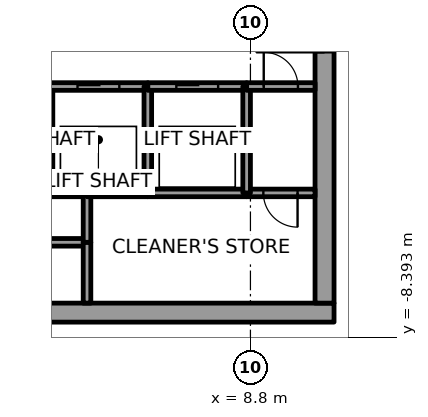
"""IFC4 building model, lengths in metres.
Left out: names, types, materials, properties, quantities, classifications, styles, units other than length and angle.
Written with IfcOpenShell. Run it as: python <this file> out.ifc"""

import sys

from ifc_helpers import new_model, si_unit, direction, frame, frame_2d, origin, place, context, subcontext, project, spatial, rectangle, extrude, element, fill, save


model = new_model("IFC4")
c1 = context("Model", 3, precision=1e-05, world=origin(), true_north=direction((0.0, 1.0)))
c2 = subcontext(c1, "Body", "Model", "MODEL_VIEW")
j1 = project(units=[si_unit("LENGTHUNIT", "METRE"), si_unit("PLANEANGLEUNIT", "RADIAN")], contexts=[c1])
p1 = place(None, origin())
s1 = spatial("IfcSite", under=j1, at=p1, CompositionType="ELEMENT")
p2 = place(p1, origin())
s2 = spatial("IfcBuilding", under=s1, at=p2, CompositionType="ELEMENT")
p3 = place(p2, frame((0.0, 0.0, 201.8)))
s3 = spatial("IfcBuildingStorey", under=s2, at=p3, CompositionType="ELEMENT", Elevation=201.8)
p4 = place(p3, frame((-11.0, -7.75, 0.0), z_axis=(0.0, 0.0, 1.0), x_axis=(1.0, 0.0, 0.0)))
e1 = element("IfcWall", 1, at=p4, inside=s3, PredefinedType="SHEAR", context=c2, shape_type="SweptSolid", body=[
    extrude(rectangle(XDim=22.0, YDim=0.5, at=frame_2d((11.0, 0.0))), origin(), (0.0, 0.0, 1.0), 4.0),
])
p5 = place(p4, frame((10.45, 0.0, 0.0)))
e2 = element("IfcOpeningElement", 2, at=p5, cuts=e1, PredefinedType="OPENING", context=c2, shape_type="SweptSolid", body=[
    extrude(rectangle(XDim=1.1, YDim=2.1, at=frame_2d((0.55, 1.05))), frame((0.0, 0.25, 0.0), z_axis=(0.0, -1.0, 0.0), x_axis=(1.0, 0.0, 0.0)), (0.0, 0.0, 1.0), 0.5),
])
p6 = place(p3, frame((10.75, -7.5, 0.0), z_axis=(0.0, 0.0, 1.0), x_axis=(0.0, 1.0, 0.0)))
e3 = element("IfcWall", 3, at=p6, inside=s3, PredefinedType="SHEAR", context=c2, shape_type="SweptSolid", body=[
    extrude(rectangle(XDim=15.0, YDim=0.5, at=frame_2d((7.5, 0.0))), origin(), (0.0, 0.0, 1.0), 4.0),
])
p7 = place(p6, frame((6.6, 0.0, 0.0)))
e4 = element("IfcOpeningElement", 4, at=p7, cuts=e3, PredefinedType="OPENING", context=c2, shape_type="SweptSolid", body=[
    extrude(rectangle(XDim=1.8, YDim=2.1, at=frame_2d((0.9, 1.05))), frame((0.0, 0.25, 0.0), z_axis=(0.0, -1.0, 0.0), x_axis=(1.0, 0.0, 0.0)), (0.0, 0.0, 1.0), 0.5),
])
p8 = place(p3, frame((4.5, -5.9, 0.0), z_axis=(0.0, 0.0, 1.0), x_axis=(-1.0, 0.0, 0.0)))
e5 = element("IfcWall", 5, at=p8, inside=s3, PredefinedType="SOLIDWALL", context=c2, shape_type="SweptSolid", body=[
    extrude(rectangle(XDim=2.5, YDim=0.2, at=frame_2d((1.25, 0.0))), origin(), (0.0, 0.0, 1.0), 3.85),
])
p9 = place(p3, frame((4.5, -4.6, 0.0), z_axis=(0.0, 0.0, 1.0), x_axis=(-1.0, 0.0, 0.0)))
e6 = element("IfcWall", 6, at=p9, inside=s3, PredefinedType="SOLIDWALL", context=c2, shape_type="SweptSolid", body=[
    extrude(rectangle(XDim=1.0, YDim=0.2, at=frame_2d((0.5, 0.0))), origin(), (0.0, 0.0, 1.0), 3.85),
])
p10 = place(p3, frame((3.5, -1.8, 0.0), z_axis=(0.0, 0.0, 1.0), x_axis=(1.0, 0.0, 0.0)))
e7 = element("IfcWall", 7, at=p10, inside=s3, PredefinedType="SOLIDWALL", context=c2, shape_type="SweptSolid", body=[
    extrude(rectangle(XDim=2.6, YDim=0.2, at=frame_2d((1.3, 0.0))), origin(), (0.0, 0.0, 1.0), 3.85),
])
p11 = place(p10, frame((0.75, 0.0, 0.0)))
e8 = element("IfcOpeningElement", 8, at=p11, cuts=e7, PredefinedType="OPENING", context=c2, shape_type="SweptSolid", body=[
    extrude(rectangle(XDim=1.1, YDim=2.1, at=frame_2d((0.55, 1.05))), frame((0.0, 0.1, 0.0), z_axis=(0.0, -1.0, 0.0), x_axis=(1.0, 0.0, 0.0)), (0.0, 0.0, 1.0), 0.2),
])
p12 = place(p3, frame((4.5, -5.9, 0.0), z_axis=(0.0, 0.0, 1.0), x_axis=(0.0, -1.0, 0.0)))
e9 = element("IfcWall", 9, at=p12, inside=s3, PredefinedType="SOLIDWALL", context=c2, shape_type="SweptSolid", body=[
    extrude(rectangle(XDim=1.6, YDim=0.2, at=frame_2d((0.8, 0.0))), origin(), (0.0, 0.0, 1.0), 3.85),
])
p13 = place(p3, frame((4.5, -4.6, 0.0), z_axis=(0.0, 0.0, 1.0), x_axis=(0.0, -1.0, 0.0)))
e10 = element("IfcWall", 10, at=p13, inside=s3, PredefinedType="SOLIDWALL", context=c2, shape_type="SweptSolid", body=[
    extrude(rectangle(XDim=1.3, YDim=0.2, at=frame_2d((0.65, 0.0))), origin(), (0.0, 0.0, 1.0), 3.85),
])
p14 = place(p3, frame((6.1, -4.6, 0.0), z_axis=(0.0, 0.0, 1.0), x_axis=(-1.0, 0.0, 0.0)))
e11 = element("IfcWall", 11, at=p14, inside=s3, PredefinedType="SOLIDWALL", context=c2, shape_type="SweptSolid", body=[
    extrude(rectangle(XDim=1.6, YDim=0.2, at=frame_2d((0.8, 0.0))), origin(), (0.0, 0.0, 1.0), 3.85),
])
p15 = place(p3, frame((8.7, -4.6, 0.0), z_axis=(0.0, 0.0, 1.0), x_axis=(-1.0, 0.0, 0.0)))
e12 = element("IfcWall", 12, at=p15, inside=s3, PredefinedType="SOLIDWALL", context=c2, shape_type="SweptSolid", body=[
    extrude(rectangle(XDim=2.6, YDim=0.2, at=frame_2d((1.3, 0.0))), origin(), (0.0, 0.0, 1.0), 3.85),
])
p16 = place(p3, frame((6.1, -4.6, 0.0), z_axis=(0.0, 0.0, 1.0), x_axis=(0.0, 1.0, 0.0)))
e13 = element("IfcWall", 13, at=p16, inside=s3, PredefinedType="SOLIDWALL", context=c2, shape_type="SweptSolid", body=[
    extrude(rectangle(XDim=2.8, YDim=0.2, at=frame_2d((1.4, 0.0))), origin(), (0.0, 0.0, 1.0), 3.85),
])
p17 = place(p3, frame((6.1, -1.8, 0.0), z_axis=(0.0, 0.0, 1.0), x_axis=(1.0, 0.0, 0.0)))
e14 = element("IfcWall", 14, at=p17, inside=s3, PredefinedType="SOLIDWALL", context=c2, shape_type="SweptSolid", body=[
    extrude(rectangle(XDim=2.6, YDim=0.2, at=frame_2d((1.3, 0.0))), origin(), (0.0, 0.0, 1.0), 3.85),
])
p18 = place(p17, frame((0.75, 0.0, 0.0)))
e15 = element("IfcOpeningElement", 15, at=p18, cuts=e14, PredefinedType="OPENING", context=c2, shape_type="SweptSolid", body=[
    extrude(rectangle(XDim=1.1, YDim=2.1, at=frame_2d((0.55, 1.05))), frame((0.0, 0.1, 0.0), z_axis=(0.0, -1.0, 0.0), x_axis=(1.0, 0.0, 0.0)), (0.0, 0.0, 1.0), 0.2),
])
p19 = place(p3, frame((10.5, -4.6, 0.0), z_axis=(0.0, 0.0, 1.0), x_axis=(-1.0, 0.0, 0.0)))
e16 = element("IfcWall", 16, at=p19, inside=s3, PredefinedType="SOLIDWALL", context=c2, shape_type="SweptSolid", body=[
    extrude(rectangle(XDim=1.8, YDim=0.2, at=frame_2d((0.9, 0.0))), origin(), (0.0, 0.0, 1.0), 3.85),
])
p20 = place(p19, frame((0.46, 0.0, 0.0)))
e17 = element("IfcOpeningElement", 17, at=p20, cuts=e16, PredefinedType="OPENING", context=c2, shape_type="SweptSolid", body=[
    extrude(rectangle(XDim=0.9, YDim=2.1, at=frame_2d((0.45, 1.05))), frame((0.0, 0.1, 0.0), z_axis=(0.0, -1.0, 0.0), x_axis=(1.0, 0.0, 0.0)), (0.0, 0.0, 1.0), 0.2),
])
p21 = place(p3, frame((8.7, -1.8, 0.0), z_axis=(0.0, 0.0, 1.0), x_axis=(0.0, -1.0, 0.0)))
e18 = element("IfcWall", 18, at=p21, inside=s3, PredefinedType="SOLIDWALL", context=c2, shape_type="SweptSolid", body=[
    extrude(rectangle(XDim=2.8, YDim=0.2, at=frame_2d((1.4, 0.0))), origin(), (0.0, 0.0, 1.0), 3.85),
])
p22 = place(p3, frame((8.7, -1.8, 0.0), z_axis=(0.0, 0.0, 1.0), x_axis=(1.0, 0.0, 0.0)))
e19 = element("IfcWall", 19, at=p22, inside=s3, PredefinedType="SOLIDWALL", context=c2, shape_type="SweptSolid", body=[
    extrude(rectangle(XDim=1.8, YDim=0.2, at=frame_2d((0.9, 0.0))), origin(), (0.0, 0.0, 1.0), 3.85),
])
p23 = place(p22, frame((0.45, 0.0, 0.0)))
e20 = element("IfcOpeningElement", 20, at=p23, cuts=e19, PredefinedType="OPENING", context=c2, shape_type="SweptSolid", body=[
    extrude(rectangle(XDim=0.9, YDim=2.1, at=frame_2d((0.45, 1.05))), frame((0.0, 0.1, 0.0), z_axis=(0.0, -1.0, 0.0), x_axis=(1.0, 0.0, 0.0)), (0.0, 0.0, 1.0), 0.2),
])
p24 = place(p11, origin())
e21 = element("IfcDoor", 21, at=p24, inside=s3, OperationType="SLIDING_TO_LEFT", PredefinedType="DOOR", context=c2, shape_type="SweptSolid", body=[
    extrude(rectangle(XDim=1.1, YDim=2.1, at=frame_2d((0.55, 1.05))), frame((0.0, 0.025, 0.0), z_axis=(0.0, -1.0, 0.0), x_axis=(1.0, 0.0, 0.0)), (0.0, 0.0, 1.0), 0.05),
])
fill(e8, e21)
p25 = place(p18, origin())
e22 = element("IfcDoor", 22, at=p25, inside=s3, OperationType="SLIDING_TO_RIGHT", PredefinedType="DOOR", context=c2, shape_type="SweptSolid", body=[
    extrude(rectangle(XDim=1.1, YDim=2.1, at=frame_2d((0.55, 1.05))), frame((0.0, 0.025, 0.0), z_axis=(0.0, -1.0, 0.0), x_axis=(1.0, 0.0, 0.0)), (0.0, 0.0, 1.0), 0.05),
])
fill(e15, e22)
p26 = place(p20, origin())
e23 = element("IfcDoor", 23, at=p26, inside=s3, OperationType="SINGLE_SWING_LEFT", PredefinedType="DOOR", context=c2, shape_type="SweptSolid", body=[
    extrude(rectangle(XDim=0.9, YDim=2.1, at=frame_2d((0.45, 1.05))), frame((0.0, 0.025, 0.0), z_axis=(0.0, -1.0, 0.0), x_axis=(1.0, 0.0, 0.0)), (0.0, 0.0, 1.0), 0.05),
])
fill(e17, e23)
p27 = place(p23, origin())
e24 = element("IfcDoor", 24, at=p27, inside=s3, OperationType="SINGLE_SWING_LEFT", PredefinedType="DOOR", context=c2, shape_type="SweptSolid", body=[
    extrude(rectangle(XDim=0.9, YDim=2.1, at=frame_2d((0.45, 1.05))), frame((0.0, 0.025, 0.0), z_axis=(0.0, -1.0, 0.0), x_axis=(1.0, 0.0, 0.0)), (0.0, 0.0, 1.0), 0.05),
])
fill(e20, e24)
p28 = place(p7, origin())
e25 = element("IfcDoor", 25, at=p28, inside=s3, OperationType="DOUBLE_DOOR_SINGLE_SWING", PredefinedType="DOOR", context=c2, shape_type="SweptSolid", body=[
    extrude(rectangle(XDim=1.8, YDim=2.1, at=frame_2d((0.9, 1.05))), frame((0.0, 0.025, 0.0), z_axis=(0.0, -1.0, 0.0), x_axis=(1.0, 0.0, 0.0)), (0.0, 0.0, 1.0), 0.05),
])
fill(e4, e25)
save(model, sys.argv[1])
